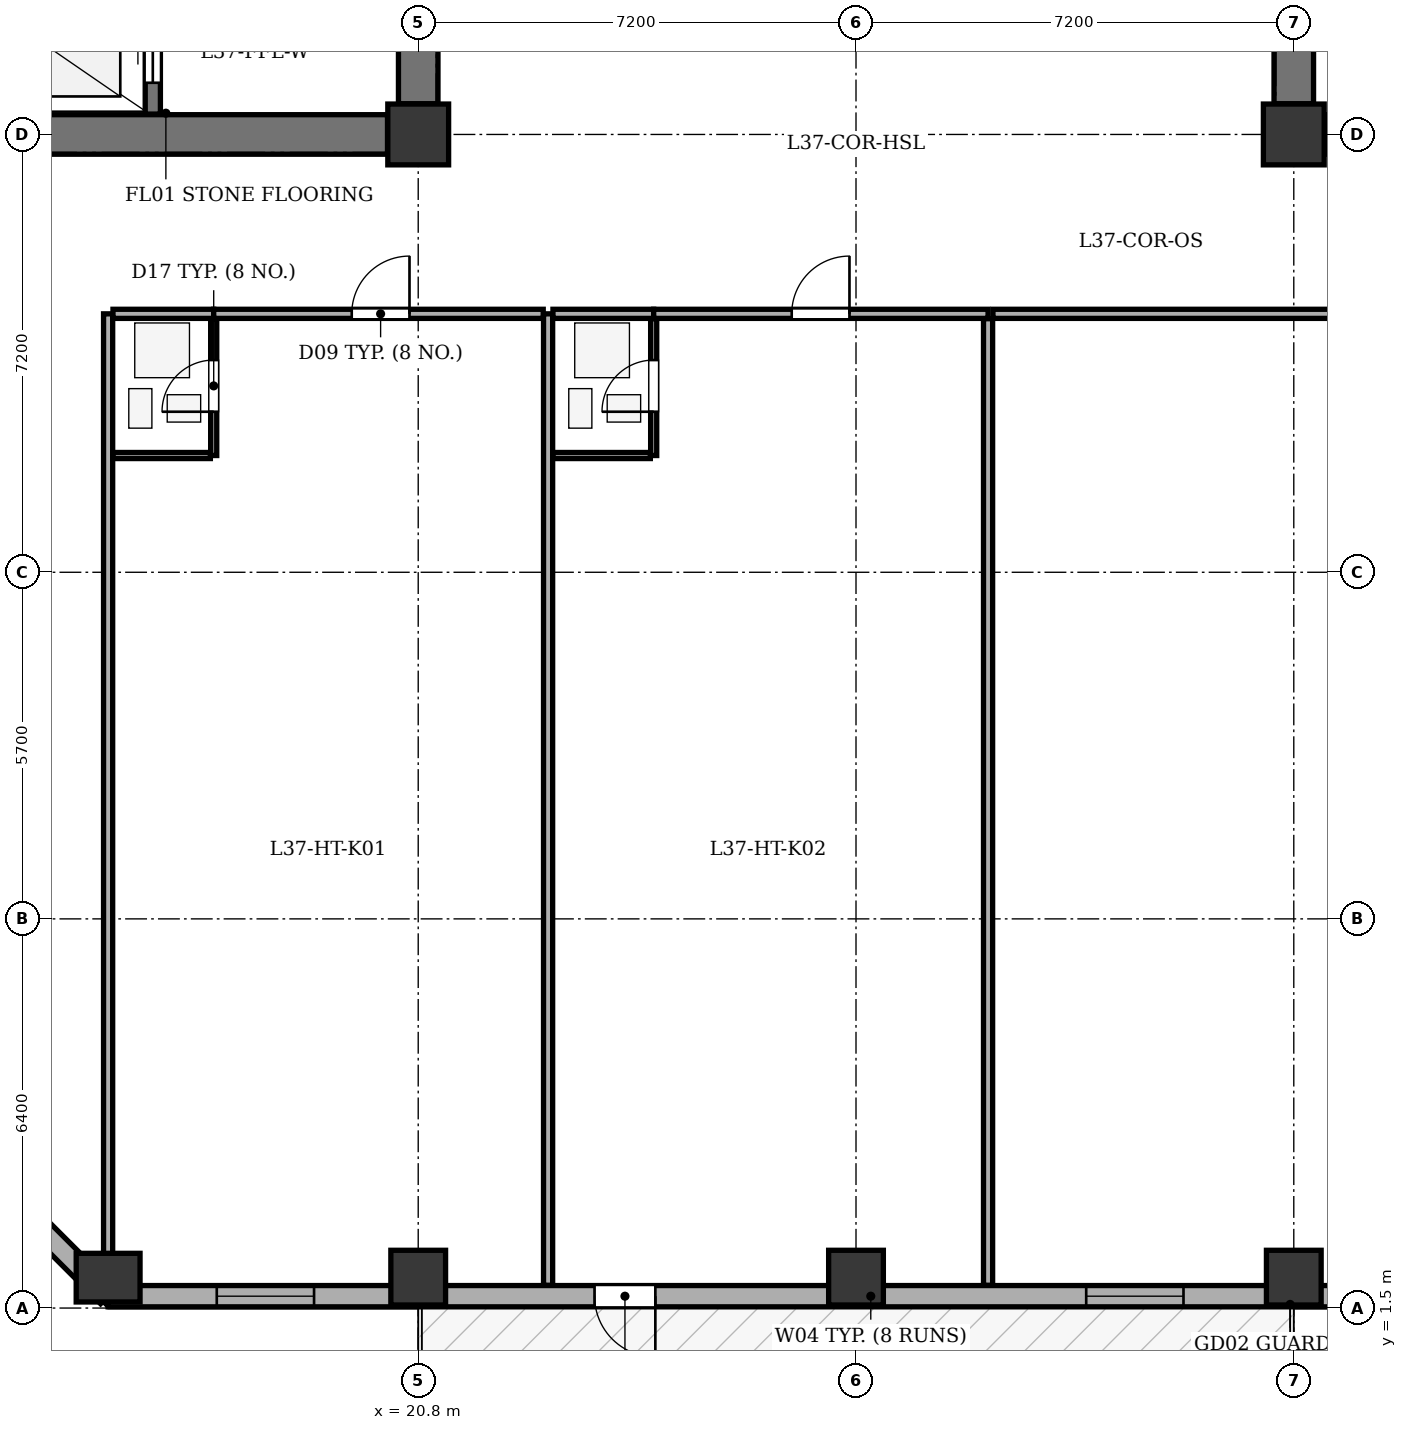
"""IFC4 building model, lengths in metres.
Left out: names, types, materials, properties, quantities, classifications, styles, units other than length and angle.
Written with IfcOpenShell. Run it as: python <this file> out.ifc"""

import sys

from ifc_helpers import new_model, si_unit, direction, frame, frame_2d, origin, origin_2d, place, context, subcontext, project, spatial, rectangle, extrude, element, fill, save


model = new_model("IFC4")
c1 = context("Model", 3, precision=1e-05, world=origin(), true_north=direction((0.0, 1.0)))
c2 = subcontext(c1, "Body", "Model", "MODEL_VIEW")
j1 = project(units=[si_unit("LENGTHUNIT", "METRE"), si_unit("PLANEANGLEUNIT", "RADIAN")], contexts=[c1])
p1 = place(None, origin())
s1 = spatial("IfcSite", under=j1, at=p1, CompositionType="ELEMENT")
p2 = place(p1, origin())
s2 = spatial("IfcBuilding", under=s1, at=p2, CompositionType="ELEMENT")
p3 = place(p2, frame((0.0, 0.0, 148.3)))
s3 = spatial("IfcBuildingStorey", under=s2, at=p3, CompositionType="ELEMENT", Elevation=148.3)
for number, where, z_axis, x_axis in (
    (1, (20.8, 20.8, 0.0), (0.0, 0.0, 1.0), (1.0, 0.0, 0.0)),
    (2, (35.2, 20.8, 0.0), (0.0, 0.0, 1.0), (1.0, 0.0, 0.0)),
):
    element("IfcColumn", number, at=place(p3, frame(where, z_axis=z_axis, x_axis=x_axis)), inside=s3, PredefinedType="COLUMN", context=c2, shape_type="SweptSolid", body=[
        extrude(rectangle(XDim=1.0, YDim=1.0, at=origin_2d()), origin(), (0.0, 0.0, 1.0), 3.5),
    ])
p4 = place(p3, frame((15.7, 2.0, 0.0), z_axis=(0.0, 0.0, 1.0), x_axis=(1.0, 0.0, 0.0)))
e3 = element("IfcColumn", 3, at=p4, inside=s3, PredefinedType="COLUMN", context=c2, shape_type="SweptSolid", body=[
    extrude(rectangle(XDim=0.8, YDim=1.05, at=origin_2d()), origin(), (0.0, 0.0, 1.0), 3.5),
])
for number, where, z_axis, x_axis in (
    (4, (20.8, 2.0, 0.0), (0.0, 0.0, 1.0), (1.0, 0.0, 0.0)),
    (5, (28.0, 2.0, 0.0), (0.0, 0.0, 1.0), (1.0, 0.0, 0.0)),
    (6, (35.2, 2.0, 0.0), (0.0, 0.0, 1.0), (1.0, 0.0, 0.0)),
):
    element("IfcColumn", number, at=place(p3, frame(where, z_axis=z_axis, x_axis=x_axis)), inside=s3, PredefinedType="COLUMN", context=c2, shape_type="SweptSolid", body=[
        extrude(rectangle(XDim=0.9, YDim=0.9, at=origin_2d()), origin(), (0.0, 0.0, 1.0), 3.5),
    ])
p5 = place(p3, frame((50.7, 1.695, 0.0), z_axis=(0.0, 0.0, 1.0), x_axis=(-1.0, 0.0, 0.0)))
e7 = element("IfcWall", 7, at=p5, inside=s3, PredefinedType="STANDARD", context=c2, shape_type="SweptSolid", body=[
    extrude(rectangle(XDim=35.0, YDim=0.35, at=frame_2d((17.5, 0.0))), origin(), (0.0, 0.0, 1.0), 2.785),
])
p6 = place(p5, frame((26.0, 0.0, 0.0)))
e8 = element("IfcOpeningElement", 8, at=p6, cuts=e7, PredefinedType="OPENING", context=c2, shape_type="SweptSolid", body=[
    extrude(rectangle(XDim=1.0, YDim=2.02, at=frame_2d((0.5, 1.01))), frame((0.0, 0.185, 0.0), z_axis=(0.0, -1.0, 0.0), x_axis=(1.0, 0.0, 0.0)), (0.0, 0.0, 1.0), 0.37),
])
p7 = place(p5, frame((1.763, 0.0, 0.75)))
e9 = element("IfcOpeningElement", 9, at=p7, cuts=e7, PredefinedType="OPENING", context=c2, shape_type="SweptSolid", body=[
    extrude(rectangle(XDim=1.6, YDim=1.75, at=frame_2d((0.8, 0.875))), frame((0.0, 0.185, 0.0), z_axis=(0.0, -1.0, 0.0), x_axis=(1.0, 0.0, 0.0)), (0.0, 0.0, 1.0), 0.37),
])
p8 = place(p5, frame((7.007, 0.0, 0.75)))
e10 = element("IfcOpeningElement", 10, at=p8, cuts=e7, PredefinedType="OPENING", context=c2, shape_type="SweptSolid", body=[
    extrude(rectangle(XDim=1.6, YDim=1.75, at=frame_2d((0.8, 0.875))), frame((0.0, 0.185, 0.0), z_axis=(0.0, -1.0, 0.0), x_axis=(1.0, 0.0, 0.0)), (0.0, 0.0, 1.0), 0.37),
])
p9 = place(p5, frame((11.293, 0.0, 0.75)))
e11 = element("IfcOpeningElement", 11, at=p9, cuts=e7, PredefinedType="OPENING", context=c2, shape_type="SweptSolid", body=[
    extrude(rectangle(XDim=2.1, YDim=1.75, at=frame_2d((1.05, 0.875))), frame((0.0, 0.185, 0.0), z_axis=(0.0, -1.0, 0.0), x_axis=(1.0, 0.0, 0.0)), (0.0, 0.0, 1.0), 0.37),
])
p10 = place(p5, frame((17.314, 0.0, 0.75)))
e12 = element("IfcOpeningElement", 12, at=p10, cuts=e7, PredefinedType="OPENING", context=c2, shape_type="SweptSolid", body=[
    extrude(rectangle(XDim=1.6, YDim=1.75, at=frame_2d((0.8, 0.875))), frame((0.0, 0.185, 0.0), z_axis=(0.0, -1.0, 0.0), x_axis=(1.0, 0.0, 0.0)), (0.0, 0.0, 1.0), 0.37),
])
p11 = place(p5, frame((31.613, 0.0, 0.75)))
e13 = element("IfcOpeningElement", 13, at=p11, cuts=e7, PredefinedType="OPENING", context=c2, shape_type="SweptSolid", body=[
    extrude(rectangle(XDim=1.6, YDim=1.75, at=frame_2d((0.8, 0.875))), frame((0.0, 0.185, 0.0), z_axis=(0.0, -1.0, 0.0), x_axis=(1.0, 0.0, 0.0)), (0.0, 0.0, 1.0), 0.37),
])
p12 = place(p3, frame((15.7, 1.695, 0.0), z_axis=(0.0, 0.0, 1.0), x_axis=(-0.707106781187, 0.707106781187, 0.0)))
e14 = element("IfcWall", 14, at=p12, inside=s3, PredefinedType="STANDARD", context=c2, shape_type="SweptSolid", body=[
    extrude(rectangle(XDim=6.795, YDim=0.35, at=frame_2d((3.397, 0.0))), origin(), (0.0, 0.0, 1.0), 2.785),
])
p13 = place(p12, frame((2.698, 0.0, 0.75)))
e15 = element("IfcOpeningElement", 15, at=p13, cuts=e14, PredefinedType="OPENING", context=c2, shape_type="SweptSolid", body=[
    extrude(rectangle(XDim=1.4, YDim=1.65, at=frame_2d((0.7, 0.825))), frame((0.0, 0.185, 0.0), z_axis=(0.0, -1.0, 0.0), x_axis=(1.0, 0.0, 0.0)), (0.0, 0.0, 1.0), 0.37),
])
p14 = place(p3, frame((13.305, 20.8, 0.0), z_axis=(0.0, 0.0, 1.0), x_axis=(1.0, 0.0, 0.0)))
e16 = element("IfcWall", 16, at=p14, inside=s3, PredefinedType="SHEAR", context=c2, shape_type="SweptSolid", body=[
    extrude(rectangle(XDim=6.99, YDim=0.65, at=frame_2d((3.495, 0.0))), origin(), (0.0, 0.0, 1.0), 3.2),
])
p15 = place(p3, frame((20.8, 21.305, 0.0), z_axis=(0.0, 0.0, 1.0), x_axis=(0.0, 1.0, 0.0)))
e17 = element("IfcWall", 17, at=p15, inside=s3, PredefinedType="SHEAR", context=c2, shape_type="SweptSolid", body=[
    extrude(rectangle(XDim=3.745, YDim=0.65, at=frame_2d((1.873, 0.0))), origin(), (0.0, 0.0, 1.0), 3.2),
])
p16 = place(p15, frame((1.295, 0.0, 0.0)))
e18 = element("IfcOpeningElement", 18, at=p16, cuts=e17, PredefinedType="OPENING", context=c2, shape_type="SweptSolid", body=[
    extrude(rectangle(XDim=1.2, YDim=2.15, at=frame_2d((0.6, 1.075))), frame((0.0, 0.335, 0.0), z_axis=(0.0, -1.0, 0.0), x_axis=(1.0, 0.0, 0.0)), (0.0, 0.0, 1.0), 0.67),
])
p17 = place(p3, frame((16.435, 21.135, 0.0), z_axis=(0.0, 0.0, 1.0), x_axis=(0.0, 1.0, 0.0)))
e19 = element("IfcWall", 19, at=p17, inside=s3, PredefinedType="SHEAR", context=c2, shape_type="SweptSolid", body=[
    extrude(rectangle(XDim=12.13, YDim=0.25, at=frame_2d((6.065, 0.0))), origin(), (0.0, 0.0, 1.0), 3.2),
])
p18 = place(p17, frame((0.515, 0.0, 0.0)))
e20 = element("IfcOpeningElement", 20, at=p18, cuts=e19, PredefinedType="OPENING", context=c2, shape_type="SweptSolid", body=[
    extrude(rectangle(XDim=1.2, YDim=2.15, at=frame_2d((0.6, 1.075))), frame((0.0, 0.135, 0.0), z_axis=(0.0, -1.0, 0.0), x_axis=(1.0, 0.0, 0.0)), (0.0, 0.0, 1.0), 0.27),
])
p19 = place(p17, frame((2.665, 0.0, 0.0)))
e21 = element("IfcOpeningElement", 21, at=p19, cuts=e19, PredefinedType="OPENING", context=c2, shape_type="SweptSolid", body=[
    extrude(rectangle(XDim=1.15, YDim=2.15, at=frame_2d((0.575, 1.075))), frame((0.0, 0.135, 0.0), z_axis=(0.0, -1.0, 0.0), x_axis=(1.0, 0.0, 0.0)), (0.0, 0.0, 1.0), 0.27),
])
p20 = place(p3, frame((35.705, 20.8, 0.0), z_axis=(0.0, 0.0, 1.0), x_axis=(1.0, 0.0, 0.0)))
e22 = element("IfcWall", 22, at=p20, inside=s3, PredefinedType="SHEAR", context=c2, shape_type="SweptSolid", body=[
    extrude(rectangle(XDim=6.99, YDim=0.65, at=frame_2d((3.495, 0.0))), origin(), (0.0, 0.0, 1.0), 3.2),
])
p21 = place(p3, frame((35.2, 21.305, 0.0), z_axis=(0.0, 0.0, 1.0), x_axis=(0.0, 1.0, 0.0)))
e23 = element("IfcWall", 23, at=p21, inside=s3, PredefinedType="SHEAR", context=c2, shape_type="SweptSolid", body=[
    extrude(rectangle(XDim=11.79, YDim=0.65, at=frame_2d((5.895, 0.0))), origin(), (0.0, 0.0, 1.0), 3.2),
])
p22 = place(p21, frame((1.295, 0.0, 0.0)))
e24 = element("IfcOpeningElement", 24, at=p22, cuts=e23, PredefinedType="OPENING", context=c2, shape_type="SweptSolid", body=[
    extrude(rectangle(XDim=1.2, YDim=2.15, at=frame_2d((0.6, 1.075))), frame((0.0, 0.335, 0.0), z_axis=(0.0, -1.0, 0.0), x_axis=(1.0, 0.0, 0.0)), (0.0, 0.0, 1.0), 0.67),
])
p23 = place(p21, frame((4.295, 0.0, 0.0)))
e25 = element("IfcOpeningElement", 25, at=p23, cuts=e23, PredefinedType="OPENING", context=c2, shape_type="SweptSolid", body=[
    extrude(rectangle(XDim=1.1, YDim=2.1, at=frame_2d((0.55, 1.05))), frame((0.0, 0.335, 0.0), z_axis=(0.0, -1.0, 0.0), x_axis=(1.0, 0.0, 0.0)), (0.0, 0.0, 1.0), 0.67),
])
p24 = place(p21, frame((6.245, 0.0, 0.0)))
e26 = element("IfcOpeningElement", 26, at=p24, cuts=e23, PredefinedType="OPENING", context=c2, shape_type="SweptSolid", body=[
    extrude(rectangle(XDim=1.1, YDim=2.1, at=frame_2d((0.55, 1.05))), frame((0.0, 0.335, 0.0), z_axis=(0.0, -1.0, 0.0), x_axis=(1.0, 0.0, 0.0)), (0.0, 0.0, 1.0), 0.67),
])
p25 = place(p21, frame((8.195, 0.0, 0.0)))
e27 = element("IfcOpeningElement", 27, at=p25, cuts=e23, PredefinedType="OPENING", context=c2, shape_type="SweptSolid", body=[
    extrude(rectangle(XDim=1.1, YDim=2.1, at=frame_2d((0.55, 1.05))), frame((0.0, 0.335, 0.0), z_axis=(0.0, -1.0, 0.0), x_axis=(1.0, 0.0, 0.0)), (0.0, 0.0, 1.0), 0.67),
])
for number, where, z_axis, x_axis in (
    (28, (15.7, 1.875, 0.0), (0.0, 0.0, 1.0), (0.0, 1.0, 0.0)),
    (29, (22.936, 1.875, 0.0), (0.0, 0.0, 1.0), (0.0, 1.0, 0.0)),
):
    element("IfcWall", number, at=place(p3, frame(where, z_axis=z_axis, x_axis=x_axis)), inside=s3, PredefinedType="PARTITIONING", context=c2, shape_type="SweptSolid", body=[
        extrude(rectangle(XDim=15.975, YDim=0.15, at=frame_2d((7.988, 0.0))), origin(), (0.0, 0.0, 1.0), 3.2),
    ])
p26 = place(p3, frame((15.78, 17.85, 0.0), z_axis=(0.0, 0.0, 1.0), x_axis=(1.0, 0.0, 0.0)))
e30 = element("IfcWall", 30, at=p26, inside=s3, PredefinedType="PARTITIONING", context=c2, shape_type="SweptSolid", body=[
    extrude(rectangle(XDim=1.656, YDim=0.15, at=frame_2d((0.828, 0.0))), origin(), (0.0, 0.0, 1.0), 3.2),
])
p27 = place(p3, frame((17.437, 17.85, 0.0), z_axis=(0.0, 0.0, 1.0), x_axis=(1.0, 0.0, 0.0)))
e31 = element("IfcWall", 31, at=p27, inside=s3, PredefinedType="PARTITIONING", context=c2, shape_type="SweptSolid", body=[
    extrude(rectangle(XDim=5.419, YDim=0.15, at=frame_2d((2.71, 0.0))), origin(), (0.0, 0.0, 1.0), 3.2),
])
p28 = place(p27, frame((2.27, 0.0, 0.0)))
e32 = element("IfcOpeningElement", 32, at=p28, cuts=e31, PredefinedType="OPENING", context=c2, shape_type="SweptSolid", body=[
    extrude(rectangle(XDim=0.95, YDim=2.1, at=frame_2d((0.475, 1.05))), frame((0.0, 0.085, 0.0), z_axis=(0.0, -1.0, 0.0), x_axis=(1.0, 0.0, 0.0)), (0.0, 0.0, 1.0), 0.17),
])
p29 = place(p3, frame((17.437, 15.52, 0.0), z_axis=(0.0, 0.0, 1.0), x_axis=(0.0, 1.0, 0.0)))
e33 = element("IfcWall", 33, at=p29, inside=s3, PredefinedType="PARTITIONING", context=c2, shape_type="SweptSolid", body=[
    extrude(rectangle(XDim=2.25, YDim=0.1, at=frame_2d((1.125, 0.0))), origin(), (0.0, 0.0, 1.0), 3.2),
])
p30 = place(p29, frame((0.72, 0.0, 0.0)))
e34 = element("IfcOpeningElement", 34, at=p30, cuts=e33, PredefinedType="OPENING", context=c2, shape_type="SweptSolid", body=[
    extrude(rectangle(XDim=0.85, YDim=2.05, at=frame_2d((0.425, 1.025))), frame((0.0, 0.06, 0.0), z_axis=(0.0, -1.0, 0.0), x_axis=(1.0, 0.0, 0.0)), (0.0, 0.0, 1.0), 0.12),
])
p31 = place(p3, frame((15.78, 15.52, 0.0), z_axis=(0.0, 0.0, 1.0), x_axis=(1.0, 0.0, 0.0)))
e35 = element("IfcWall", 35, at=p31, inside=s3, PredefinedType="PARTITIONING", context=c2, shape_type="SweptSolid", body=[
    extrude(rectangle(XDim=1.602, YDim=0.1, at=frame_2d((0.801, 0.0))), origin(), (0.0, 0.0, 1.0), 3.2),
])
p32 = place(p3, frame((23.016, 17.85, 0.0), z_axis=(0.0, 0.0, 1.0), x_axis=(1.0, 0.0, 0.0)))
e36 = element("IfcWall", 36, at=p32, inside=s3, PredefinedType="PARTITIONING", context=c2, shape_type="SweptSolid", body=[
    extrude(rectangle(XDim=1.656, YDim=0.15, at=frame_2d((0.828, 0.0))), origin(), (0.0, 0.0, 1.0), 3.2),
])
p33 = place(p3, frame((24.673, 17.85, 0.0), z_axis=(0.0, 0.0, 1.0), x_axis=(1.0, 0.0, 0.0)))
e37 = element("IfcWall", 37, at=p33, inside=s3, PredefinedType="PARTITIONING", context=c2, shape_type="SweptSolid", body=[
    extrude(rectangle(XDim=5.5, YDim=0.15, at=frame_2d((2.75, 0.0))), origin(), (0.0, 0.0, 1.0), 3.2),
])
p34 = place(p33, frame((2.27, 0.0, 0.0)))
e38 = element("IfcOpeningElement", 38, at=p34, cuts=e37, PredefinedType="OPENING", context=c2, shape_type="SweptSolid", body=[
    extrude(rectangle(XDim=0.95, YDim=2.1, at=frame_2d((0.475, 1.05))), frame((0.0, 0.085, 0.0), z_axis=(0.0, -1.0, 0.0), x_axis=(1.0, 0.0, 0.0)), (0.0, 0.0, 1.0), 0.17),
])
p35 = place(p3, frame((24.673, 15.52, 0.0), z_axis=(0.0, 0.0, 1.0), x_axis=(0.0, 1.0, 0.0)))
e39 = element("IfcWall", 39, at=p35, inside=s3, PredefinedType="PARTITIONING", context=c2, shape_type="SweptSolid", body=[
    extrude(rectangle(XDim=2.25, YDim=0.1, at=frame_2d((1.125, 0.0))), origin(), (0.0, 0.0, 1.0), 3.2),
])
p36 = place(p35, frame((0.72, 0.0, 0.0)))
e40 = element("IfcOpeningElement", 40, at=p36, cuts=e39, PredefinedType="OPENING", context=c2, shape_type="SweptSolid", body=[
    extrude(rectangle(XDim=0.85, YDim=2.05, at=frame_2d((0.425, 1.025))), frame((0.0, 0.06, 0.0), z_axis=(0.0, -1.0, 0.0), x_axis=(1.0, 0.0, 0.0)), (0.0, 0.0, 1.0), 0.12),
])
p37 = place(p3, frame((23.016, 15.52, 0.0), z_axis=(0.0, 0.0, 1.0), x_axis=(1.0, 0.0, 0.0)))
e41 = element("IfcWall", 41, at=p37, inside=s3, PredefinedType="PARTITIONING", context=c2, shape_type="SweptSolid", body=[
    extrude(rectangle(XDim=1.602, YDim=0.1, at=frame_2d((0.801, 0.0))), origin(), (0.0, 0.0, 1.0), 3.2),
])
p38 = place(p3, frame((30.172, 1.875, 0.0), z_axis=(0.0, 0.0, 1.0), x_axis=(0.0, 1.0, 0.0)))
e42 = element("IfcWall", 42, at=p38, inside=s3, PredefinedType="PARTITIONING", context=c2, shape_type="SweptSolid", body=[
    extrude(rectangle(XDim=15.895, YDim=0.15, at=frame_2d((7.948, 0.0))), origin(), (0.0, 0.0, 1.0), 3.2),
])
p39 = place(p3, frame((30.252, 17.85, 0.0), z_axis=(0.0, 0.0, 1.0), x_axis=(1.0, 0.0, 0.0)))
e43 = element("IfcWall", 43, at=p39, inside=s3, PredefinedType="PARTITIONING", context=c2, shape_type="SweptSolid", body=[
    extrude(rectangle(XDim=15.598, YDim=0.15, at=frame_2d((7.799, 0.0))), origin(), (0.0, 0.0, 1.0), 3.2),
])
p40 = place(p39, frame((7.239, 0.0, 0.0)))
e44 = element("IfcOpeningElement", 44, at=p40, cuts=e43, PredefinedType="OPENING", context=c2, shape_type="SweptSolid", body=[
    extrude(rectangle(XDim=1.0, YDim=2.1, at=frame_2d((0.5, 1.05))), frame((0.0, 0.085, 0.0), z_axis=(0.0, -1.0, 0.0), x_axis=(1.0, 0.0, 0.0)), (0.0, 0.0, 1.0), 0.17),
])
p41 = place(p6, origin())
e45 = element("IfcDoor", 45, at=p41, inside=s3, OperationType="SINGLE_SWING_LEFT", PredefinedType="DOOR", context=c2, shape_type="SweptSolid", body=[
    extrude(rectangle(XDim=1.0, YDim=2.02, at=frame_2d((0.5, 1.01))), frame((0.0, 0.025, 0.0), z_axis=(0.0, -1.0, 0.0), x_axis=(1.0, 0.0, 0.0)), (0.0, 0.0, 1.0), 0.05),
])
fill(e8, e45)
p42 = place(p10, origin())
e46 = element("IfcWindow", 46, at=p42, inside=s3, PartitioningType="SINGLE_PANEL", PredefinedType="WINDOW", context=c2, shape_type="SweptSolid", body=[
    extrude(rectangle(XDim=1.6, YDim=1.75, at=frame_2d((0.8, 0.875))), frame((0.0, -0.01, 0.0), z_axis=(0.0, -1.0, 0.0), x_axis=(1.0, 0.0, 0.0)), (0.0, 0.0, 1.0), 0.06),
])
fill(e12, e46)
p43 = place(p11, origin())
e47 = element("IfcWindow", 47, at=p43, inside=s3, PartitioningType="SINGLE_PANEL", PredefinedType="WINDOW", context=c2, shape_type="SweptSolid", body=[
    extrude(rectangle(XDim=1.6, YDim=1.75, at=frame_2d((0.8, 0.875))), frame((0.0, -0.01, 0.0), z_axis=(0.0, -1.0, 0.0), x_axis=(1.0, 0.0, 0.0)), (0.0, 0.0, 1.0), 0.06),
])
fill(e13, e47)
p44 = place(p18, origin())
e48 = element("IfcDoor", 48, at=p44, inside=s3, OperationType="DOUBLE_DOOR_SLIDING", PredefinedType="DOOR", context=c2, shape_type="SweptSolid", body=[
    extrude(rectangle(XDim=1.2, YDim=2.15, at=frame_2d((0.6, 1.075))), frame((0.0, 0.025, 0.0), z_axis=(0.0, -1.0, 0.0), x_axis=(1.0, 0.0, 0.0)), (0.0, 0.0, 1.0), 0.05),
])
fill(e20, e48)
p45 = place(p30, origin())
e49 = element("IfcDoor", 49, at=p45, inside=s3, OperationType="SINGLE_SWING_LEFT", PredefinedType="DOOR", context=c2, shape_type="SweptSolid", body=[
    extrude(rectangle(XDim=0.85, YDim=2.05, at=frame_2d((0.425, 1.025))), frame((0.0, 0.025, 0.0), z_axis=(0.0, -1.0, 0.0), x_axis=(1.0, 0.0, 0.0)), (0.0, 0.0, 1.0), 0.05),
])
fill(e34, e49)
p46 = place(p28, origin())
e50 = element("IfcDoor", 50, at=p46, inside=s3, OperationType="SINGLE_SWING_RIGHT", PredefinedType="DOOR", context=c2, shape_type="SweptSolid", body=[
    extrude(rectangle(XDim=0.95, YDim=2.1, at=frame_2d((0.475, 1.05))), frame((0.0, 0.025, 0.0), z_axis=(0.0, -1.0, 0.0), x_axis=(1.0, 0.0, 0.0)), (0.0, 0.0, 1.0), 0.05),
])
fill(e32, e50)
p47 = place(p36, origin())
e51 = element("IfcDoor", 51, at=p47, inside=s3, OperationType="SINGLE_SWING_LEFT", PredefinedType="DOOR", context=c2, shape_type="SweptSolid", body=[
    extrude(rectangle(XDim=0.85, YDim=2.05, at=frame_2d((0.425, 1.025))), frame((0.0, 0.025, 0.0), z_axis=(0.0, -1.0, 0.0), x_axis=(1.0, 0.0, 0.0)), (0.0, 0.0, 1.0), 0.05),
])
fill(e40, e51)
p48 = place(p34, origin())
e52 = element("IfcDoor", 52, at=p48, inside=s3, OperationType="SINGLE_SWING_RIGHT", PredefinedType="DOOR", context=c2, shape_type="SweptSolid", body=[
    extrude(rectangle(XDim=0.95, YDim=2.1, at=frame_2d((0.475, 1.05))), frame((0.0, 0.025, 0.0), z_axis=(0.0, -1.0, 0.0), x_axis=(1.0, 0.0, 0.0)), (0.0, 0.0, 1.0), 0.05),
])
fill(e38, e52)
save(model, sys.argv[1])
